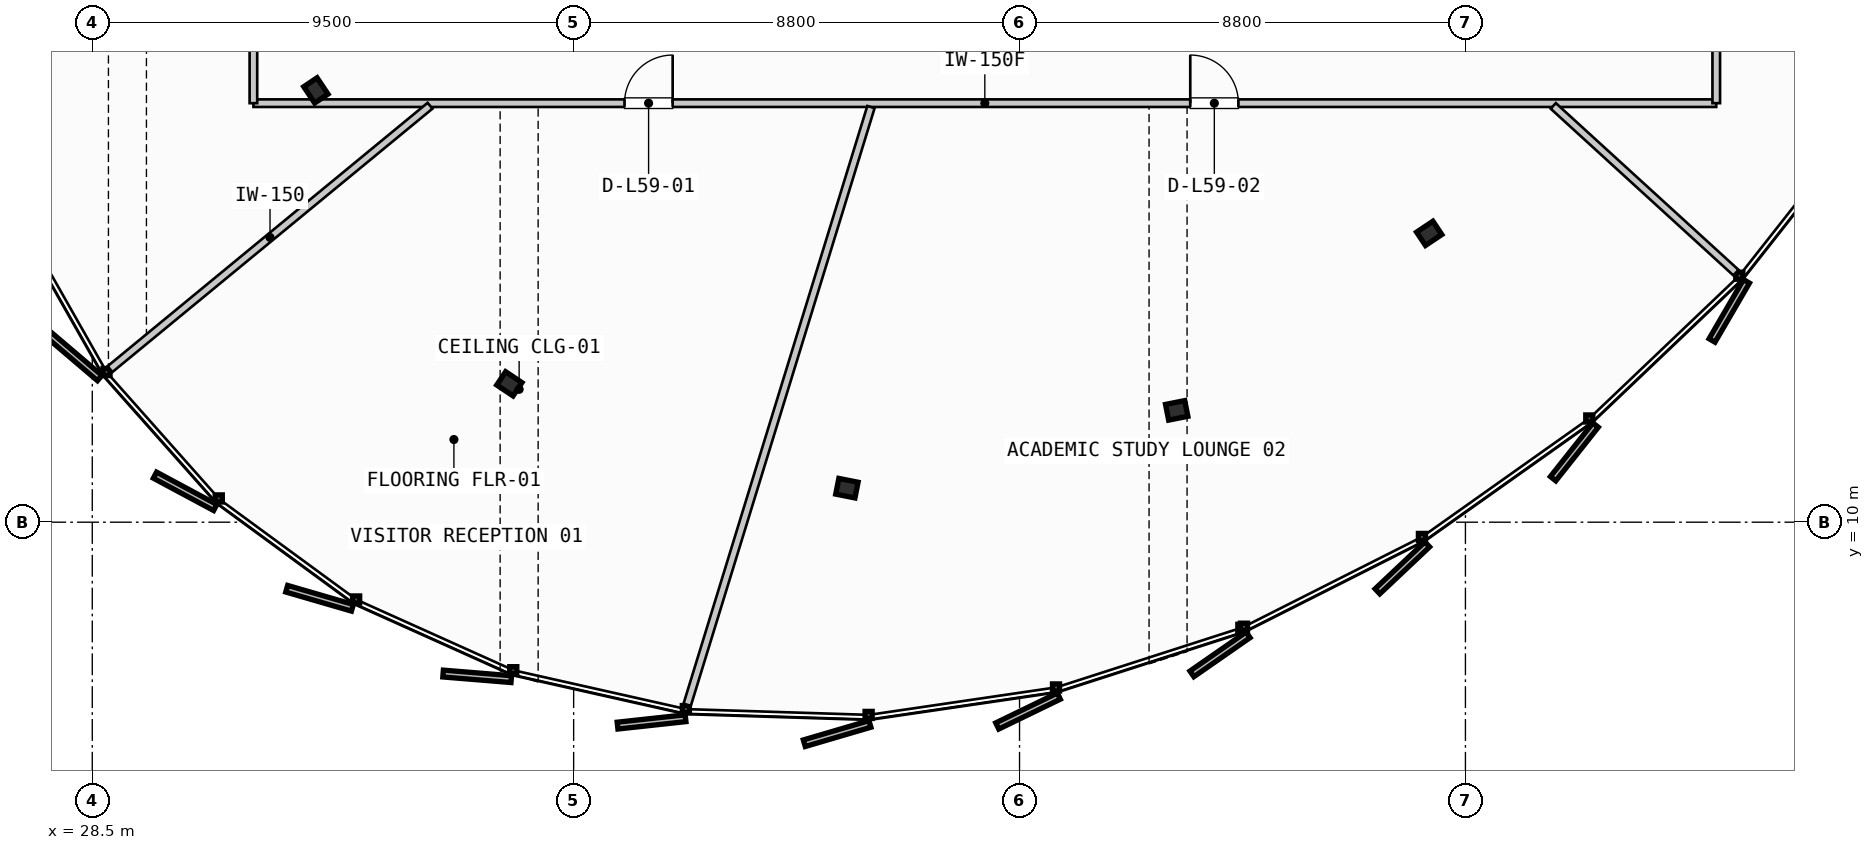
"""IFC4 building model, lengths in metres.
Left out: names, types, materials, properties, quantities, classifications, styles, units other than length and angle.
Written with IfcOpenShell. Run it as: python <this file> out.ifc"""

import sys

from ifc_helpers import new_model, si_unit, direction, frame, frame_2d, origin, origin_2d, place, context, subcontext, project, spatial, rectangle, i_section, extrude, source, transform, mapped, element, fill, save


model = new_model("IFC4")
c1 = context("Model", 3, precision=1e-05, world=origin(), true_north=direction((0.0, 1.0)))
c2 = subcontext(c1, "Body", "Model", "MODEL_VIEW")
j1 = project(units=[si_unit("LENGTHUNIT", "METRE"), si_unit("PLANEANGLEUNIT", "RADIAN")], contexts=[c1])
p1 = place(None, origin())
s1 = spatial("IfcSite", under=j1, at=p1, CompositionType="ELEMENT")
p2 = place(p1, origin())
s2 = spatial("IfcBuilding", under=s1, at=p2, CompositionType="ELEMENT")
p3 = place(p2, frame((0.0, 0.0, 228.4)))
s3 = spatial("IfcBuildingStorey", under=s2, at=p3, CompositionType="ELEMENT", Elevation=228.4)
m1 = source(origin(), c2, "Body", "SweptSolid", [
    extrude(i_section(OverallWidth=0.387, OverallDepth=0.316, WebThickness=0.019, FlangeThickness=0.028, FilletRadius=0.015, at=origin_2d()), origin(), (0.0, 0.0, 1.0), 3.21),
])
for number, where, z_axis, x_axis in (
    (1, (32.913, 18.521, 0.0), (0.0, 0.0, 1.0), (-0.831, -0.556, 0.0)),
    (2, (36.731, 12.731, 0.0), (0.0, 0.0, 1.0), (-0.556, -0.831, 0.0)),
    (3, (43.393, 10.671, 0.0), (0.0, 0.0, 1.0), (-0.195, -0.981, 0.0)),
    (4, (49.902, 12.207, 0.0), (0.0, 0.0, 1.0), (0.195, -0.981, 0.0)),
    (5, (54.885, 15.7, 0.0), (0.0, 0.0, 1.0), (0.556, -0.831, 0.0)),
):
    element("IfcColumn", number, at=place(p3, frame(where, z_axis=z_axis, x_axis=x_axis)), inside=s3, PredefinedType="COLUMN", context=c2, shape_type="MappedRepresentation", body=[
        mapped(m1, transform((0.0, 0.0, 0.0), scale=1.0)),
    ])
p4 = place(p3, frame((31.68, 18.269, 0.0), z_axis=(0.0, 0.0, 1.0), x_axis=(1.0, 0.0, 0.0)))
e6 = element("IfcWall", 6, at=p4, inside=s3, PredefinedType="PARTITIONING", context=c2, shape_type="SweptSolid", body=[
    extrude(rectangle(XDim=28.87, YDim=0.15, at=frame_2d((14.435, 0.0))), origin(), (0.0, 0.0, 1.0), 2.28),
])
p5 = place(p4, frame((7.324, 0.0, 0.0)))
e7 = element("IfcOpeningElement", 7, at=p5, cuts=e6, PredefinedType="OPENING", context=c2, shape_type="SweptSolid", body=[
    extrude(rectangle(XDim=0.95, YDim=2.15, at=frame_2d((0.475, 1.075))), frame((0.0, 0.085, 0.0), z_axis=(0.0, -1.0, 0.0), x_axis=(1.0, 0.0, 0.0)), (0.0, 0.0, 1.0), 0.17),
])
p6 = place(p4, frame((18.49, 0.0, 0.0)))
e8 = element("IfcOpeningElement", 8, at=p6, cuts=e6, PredefinedType="OPENING", context=c2, shape_type="SweptSolid", body=[
    extrude(rectangle(XDim=0.95, YDim=2.15, at=frame_2d((0.475, 1.075))), frame((0.0, 0.085, 0.0), z_axis=(0.0, -1.0, 0.0), x_axis=(1.0, 0.0, 0.0)), (0.0, 0.0, 1.0), 0.17),
])
p7 = place(p3, frame((60.55, 18.269, 0.0), z_axis=(0.0, 0.0, 1.0), x_axis=(0.0, 1.0, 0.0)))
e9 = element("IfcWall", 9, at=p7, inside=s3, PredefinedType="PARTITIONING", context=c2, shape_type="SweptSolid", body=[
    extrude(rectangle(XDim=18.831, YDim=0.15, at=frame_2d((9.416, 0.0))), origin(), (0.0, 0.0, 1.0), 2.28),
])
p8 = place(p7, frame((8.94, 0.0, 0.0)))
e10 = element("IfcOpeningElement", 10, at=p8, cuts=e9, PredefinedType="OPENING", context=c2, shape_type="SweptSolid", body=[
    extrude(rectangle(XDim=0.95, YDim=2.15, at=frame_2d((0.475, 1.075))), frame((0.0, 0.085, 0.0), z_axis=(0.0, -1.0, 0.0), x_axis=(1.0, 0.0, 0.0)), (0.0, 0.0, 1.0), 0.17),
])
p9 = place(p3, frame((31.68, 37.1, 0.0), z_axis=(0.0, 0.0, 1.0), x_axis=(0.0, -1.0, 0.0)))
e11 = element("IfcWall", 11, at=p9, inside=s3, PredefinedType="PARTITIONING", context=c2, shape_type="SweptSolid", body=[
    extrude(rectangle(XDim=18.831, YDim=0.15, at=frame_2d((9.416, 0.0))), origin(), (0.0, 0.0, 1.0), 2.28),
])
p10 = place(p9, frame((8.94, 0.0, 0.0)))
e12 = element("IfcOpeningElement", 12, at=p10, cuts=e11, PredefinedType="OPENING", context=c2, shape_type="SweptSolid", body=[
    extrude(rectangle(XDim=0.95, YDim=2.15, at=frame_2d((0.475, 1.075))), frame((0.0, 0.085, 0.0), z_axis=(0.0, -1.0, 0.0), x_axis=(1.0, 0.0, 0.0)), (0.0, 0.0, 1.0), 0.17),
])
p11 = place(p3, frame((35.166, 18.218, 0.0), z_axis=(0.0, 0.0, 1.0), x_axis=(-0.772174872744, -0.635410076961, 0.0)))
e13 = element("IfcWall", 13, at=p11, inside=s3, PredefinedType="PARTITIONING", context=c2, shape_type="SweptSolid", body=[
    extrude(rectangle(XDim=8.179, YDim=0.15, at=frame_2d((4.09, 0.0))), origin(), (0.0, 0.0, 1.0), 2.28),
])
p12 = place(p3, frame((43.868, 18.192, 0.0), z_axis=(0.0, 0.0, 1.0), x_axis=(-0.293900937089, -0.955835885065, 0.0)))
e14 = element("IfcWall", 14, at=p12, inside=s3, PredefinedType="PARTITIONING", context=c2, shape_type="SweptSolid", body=[
    extrude(rectangle(XDim=12.34, YDim=0.15, at=frame_2d((6.17, 0.0))), origin(), (0.0, 0.0, 1.0), 2.28),
])
p13 = place(p3, frame((57.333, 18.215, 0.0), z_axis=(0.0, 0.0, 1.0), x_axis=(0.738680382418, -0.674055852753, 0.0)))
e15 = element("IfcWall", 15, at=p13, inside=s3, PredefinedType="PARTITIONING", context=c2, shape_type="SweptSolid", body=[
    extrude(rectangle(XDim=4.881, YDim=0.15, at=frame_2d((2.44, 0.0))), origin(), (0.0, 0.0, 1.0), 2.28),
])
m2 = source(origin(), c2, "Body", "SweptSolid", [
    extrude(rectangle(XDim=0.95, YDim=2.15, at=frame_2d((0.475, 1.075))), frame((0.0, 0.025, 0.0), z_axis=(0.0, -1.0, 0.0), x_axis=(1.0, 0.0, 0.0)), (0.0, 0.0, 1.0), 0.05),
])
p14 = place(p5, origin())
e16 = element("IfcDoor", 16, at=p14, inside=s3, OperationType="SINGLE_SWING_RIGHT", PredefinedType="DOOR", context=c2, shape_type="MappedRepresentation", body=[
    mapped(m2, transform((0.0, 0.0, 0.0), scale=1.0)),
])
fill(e7, e16)
p15 = place(p6, origin())
e17 = element("IfcDoor", 17, at=p15, inside=s3, OperationType="SINGLE_SWING_LEFT", PredefinedType="DOOR", context=c2, shape_type="MappedRepresentation", body=[
    mapped(m2, transform((0.0, 0.0, 0.0), scale=1.0)),
])
fill(e8, e17)
save(model, sys.argv[1])
